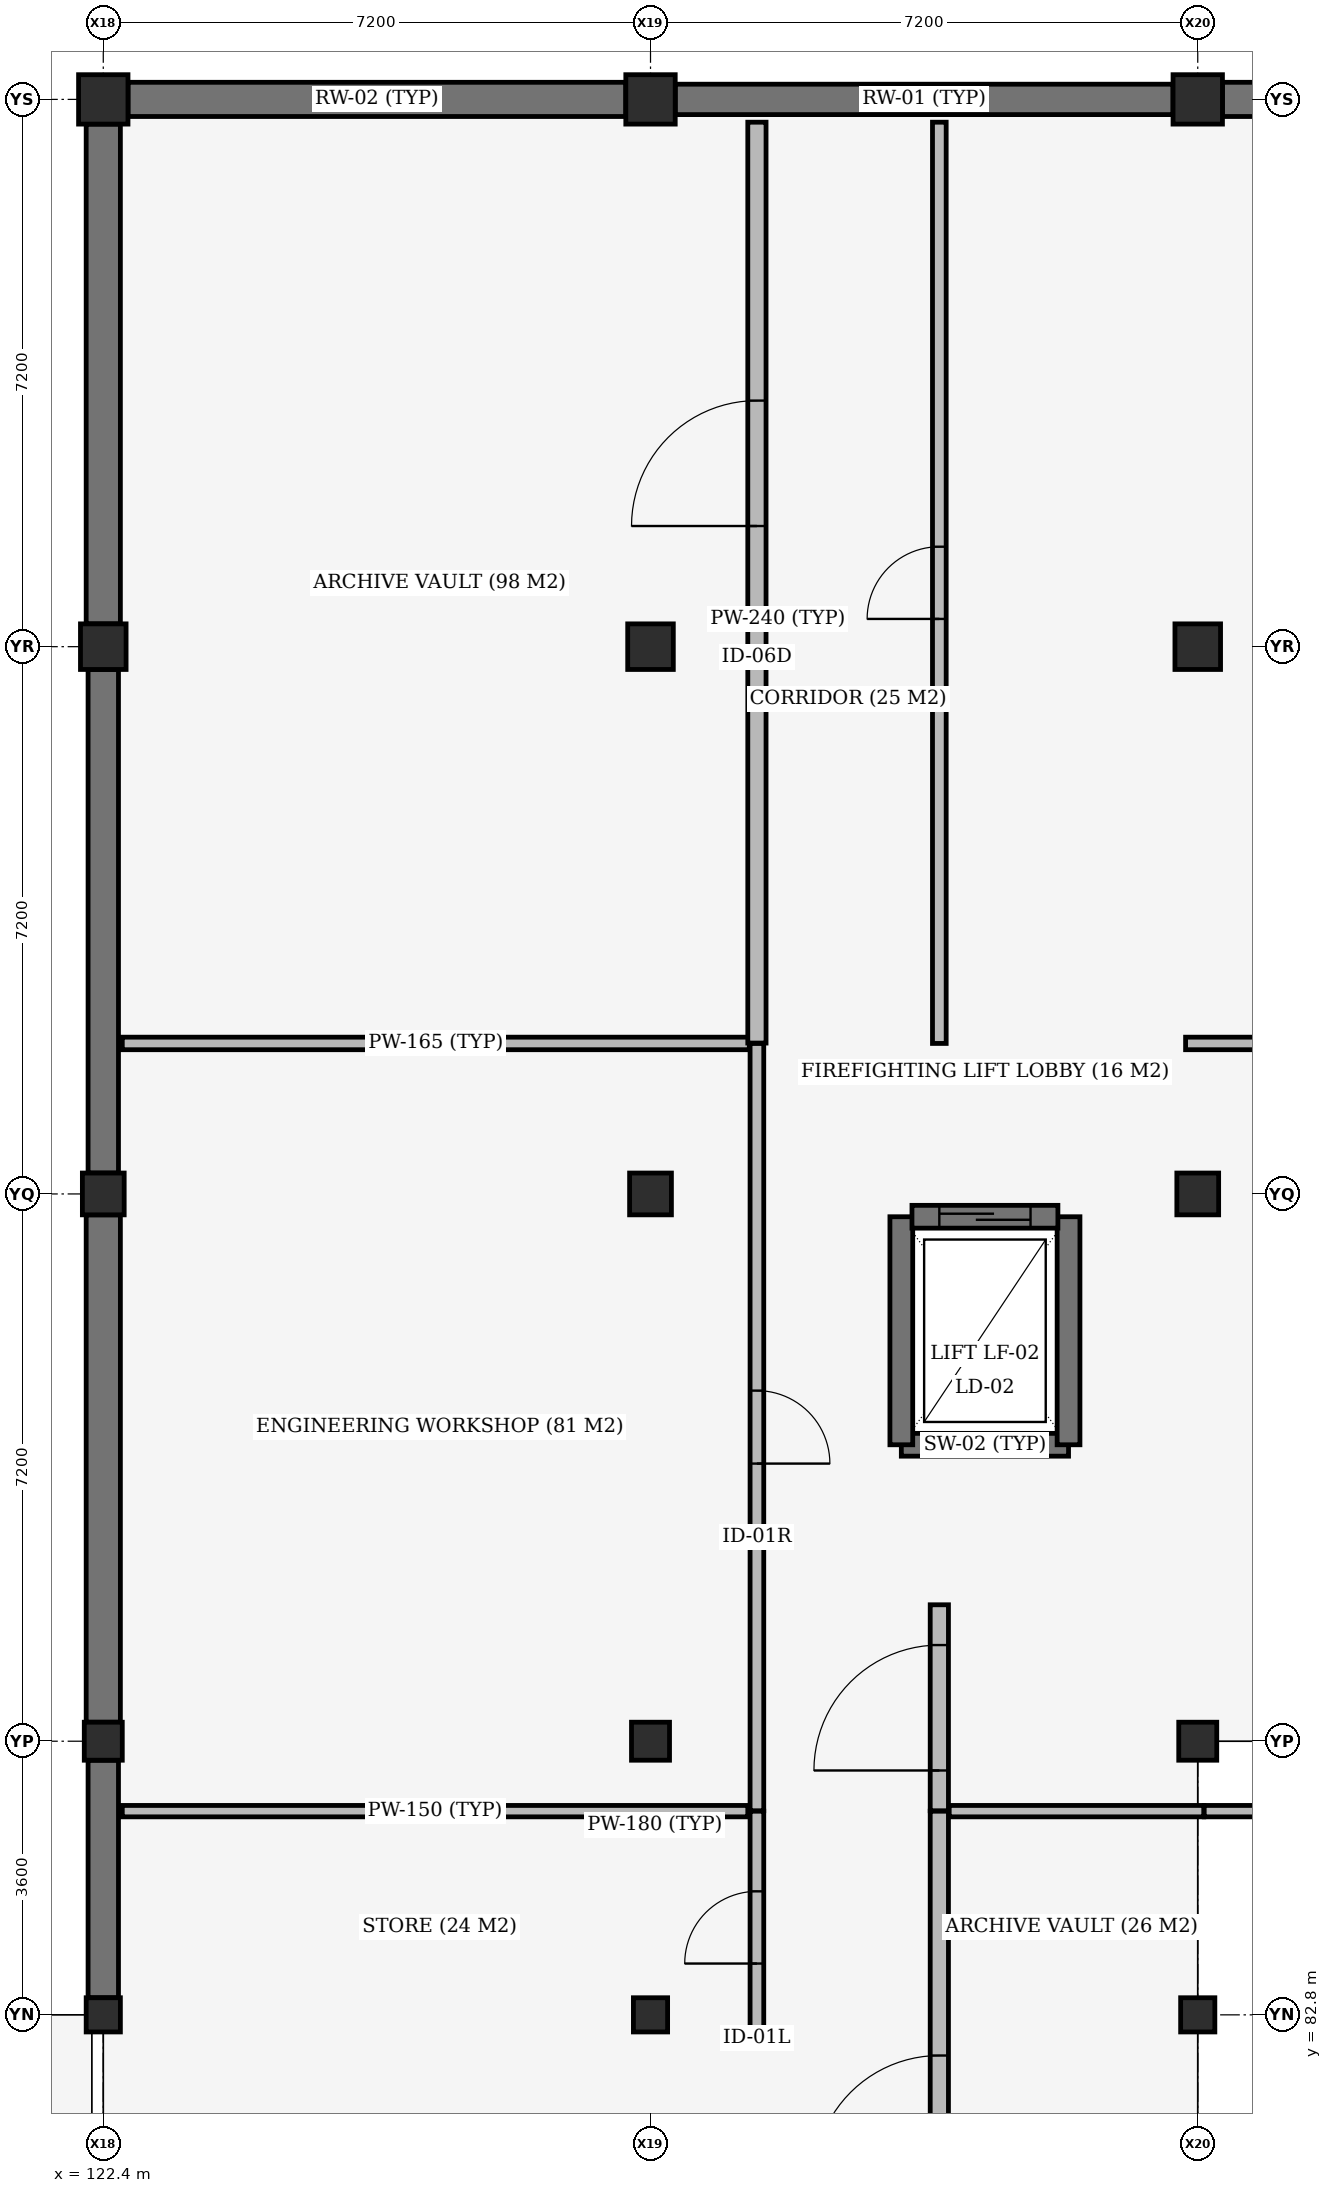
"""IFC4 building model, lengths in metres.
Left out: names, types, materials, properties, quantities, classifications, styles, units other than length and angle.
Written with IfcOpenShell. Run it as: python <this file> out.ifc"""

import sys

from ifc_helpers import new_model, si_unit, direction, frame, frame_2d, origin, origin_2d, place, context, subcontext, project, spatial, rectangle, extrude, element, fill, save


model = new_model("IFC4")
c1 = context("Model", 3, precision=1e-05, world=origin(), true_north=direction((0.0, 1.0)))
c2 = subcontext(c1, "Body", "Model", "MODEL_VIEW")
j1 = project(units=[si_unit("LENGTHUNIT", "METRE"), si_unit("PLANEANGLEUNIT", "RADIAN")], contexts=[c1])
p1 = place(None, origin())
s1 = spatial("IfcSite", under=j1, at=p1, CompositionType="ELEMENT")
p2 = place(p1, origin())
s2 = spatial("IfcBuilding", under=s1, at=p2, CompositionType="ELEMENT")
p3 = place(p2, frame((0.0, 0.0, -4.5)))
s3 = spatial("IfcBuildingStorey", under=s2, at=p3, CompositionType="ELEMENT", Elevation=-4.5)
p4 = place(p3, frame((122.4, 82.8, -0.42), z_axis=(0.0, 0.0, 1.0), x_axis=(1.0, 0.0, 0.0)))
e1 = element("IfcColumn", 1, at=p4, inside=s3, PredefinedType="COLUMN", context=c2, shape_type="SweptSolid", body=[
    extrude(rectangle(XDim=0.45, YDim=0.45, at=origin_2d()), origin(), (0.0, 0.0, 1.0), 4.6),
])
p5 = place(p3, frame((122.4, 86.4, -0.42), z_axis=(0.0, 0.0, 1.0), x_axis=(1.0, 0.0, 0.0)))
e2 = element("IfcColumn", 2, at=p5, inside=s3, PredefinedType="COLUMN", context=c2, shape_type="SweptSolid", body=[
    extrude(rectangle(XDim=0.5, YDim=0.5, at=origin_2d()), origin(), (0.0, 0.0, 1.0), 4.6),
])
p6 = place(p3, frame((122.4, 93.6, -0.42), z_axis=(0.0, 0.0, 1.0), x_axis=(1.0, 0.0, 0.0)))
e3 = element("IfcColumn", 3, at=p6, inside=s3, PredefinedType="COLUMN", context=c2, shape_type="SweptSolid", body=[
    extrude(rectangle(XDim=0.55, YDim=0.55, at=origin_2d()), origin(), (0.0, 0.0, 1.0), 4.6),
])
p7 = place(p3, frame((122.4, 100.8, -0.42), z_axis=(0.0, 0.0, 1.0), x_axis=(1.0, 0.0, 0.0)))
e4 = element("IfcColumn", 4, at=p7, inside=s3, PredefinedType="COLUMN", context=c2, shape_type="SweptSolid", body=[
    extrude(rectangle(XDim=0.6, YDim=0.6, at=origin_2d()), origin(), (0.0, 0.0, 1.0), 4.6),
])
p8 = place(p3, frame((122.4, 108.0, -0.42), z_axis=(0.0, 0.0, 1.0), x_axis=(1.0, 0.0, 0.0)))
e5 = element("IfcColumn", 5, at=p8, inside=s3, PredefinedType="COLUMN", context=c2, shape_type="SweptSolid", body=[
    extrude(rectangle(XDim=0.65, YDim=0.65, at=origin_2d()), origin(), (0.0, 0.0, 1.0), 4.6),
])
p9 = place(p3, frame((129.6, 82.8, -0.42), z_axis=(0.0, 0.0, 1.0), x_axis=(1.0, 0.0, 0.0)))
e6 = element("IfcColumn", 6, at=p9, inside=s3, PredefinedType="COLUMN", context=c2, shape_type="SweptSolid", body=[
    extrude(rectangle(XDim=0.45, YDim=0.45, at=origin_2d()), origin(), (0.0, 0.0, 1.0), 4.6),
])
p10 = place(p3, frame((129.6, 86.4, -0.42), z_axis=(0.0, 0.0, 1.0), x_axis=(1.0, 0.0, 0.0)))
e7 = element("IfcColumn", 7, at=p10, inside=s3, PredefinedType="COLUMN", context=c2, shape_type="SweptSolid", body=[
    extrude(rectangle(XDim=0.5, YDim=0.5, at=origin_2d()), origin(), (0.0, 0.0, 1.0), 4.6),
])
p11 = place(p3, frame((129.6, 93.6, -0.42), z_axis=(0.0, 0.0, 1.0), x_axis=(1.0, 0.0, 0.0)))
e8 = element("IfcColumn", 8, at=p11, inside=s3, PredefinedType="COLUMN", context=c2, shape_type="SweptSolid", body=[
    extrude(rectangle(XDim=0.55, YDim=0.55, at=origin_2d()), origin(), (0.0, 0.0, 1.0), 4.6),
])
p12 = place(p3, frame((129.6, 100.8, -0.42), z_axis=(0.0, 0.0, 1.0), x_axis=(1.0, 0.0, 0.0)))
e9 = element("IfcColumn", 9, at=p12, inside=s3, PredefinedType="COLUMN", context=c2, shape_type="SweptSolid", body=[
    extrude(rectangle(XDim=0.6, YDim=0.6, at=origin_2d()), origin(), (0.0, 0.0, 1.0), 4.6),
])
p13 = place(p3, frame((129.6, 108.0, -0.42), z_axis=(0.0, 0.0, 1.0), x_axis=(1.0, 0.0, 0.0)))
e10 = element("IfcColumn", 10, at=p13, inside=s3, PredefinedType="COLUMN", context=c2, shape_type="SweptSolid", body=[
    extrude(rectangle(XDim=0.65, YDim=0.65, at=origin_2d()), origin(), (0.0, 0.0, 1.0), 4.6),
])
p14 = place(p3, frame((136.8, 82.8, -0.42), z_axis=(0.0, 0.0, 1.0), x_axis=(1.0, 0.0, 0.0)))
e11 = element("IfcColumn", 11, at=p14, inside=s3, PredefinedType="COLUMN", context=c2, shape_type="SweptSolid", body=[
    extrude(rectangle(XDim=0.45, YDim=0.45, at=origin_2d()), origin(), (0.0, 0.0, 1.0), 4.6),
])
p15 = place(p3, frame((136.8, 86.4, -0.42), z_axis=(0.0, 0.0, 1.0), x_axis=(1.0, 0.0, 0.0)))
e12 = element("IfcColumn", 12, at=p15, inside=s3, PredefinedType="COLUMN", context=c2, shape_type="SweptSolid", body=[
    extrude(rectangle(XDim=0.5, YDim=0.5, at=origin_2d()), origin(), (0.0, 0.0, 1.0), 4.6),
])
p16 = place(p3, frame((136.8, 93.6, -0.42), z_axis=(0.0, 0.0, 1.0), x_axis=(1.0, 0.0, 0.0)))
e13 = element("IfcColumn", 13, at=p16, inside=s3, PredefinedType="COLUMN", context=c2, shape_type="SweptSolid", body=[
    extrude(rectangle(XDim=0.55, YDim=0.55, at=origin_2d()), origin(), (0.0, 0.0, 1.0), 4.6),
])
p17 = place(p3, frame((136.8, 100.8, -0.42), z_axis=(0.0, 0.0, 1.0), x_axis=(1.0, 0.0, 0.0)))
e14 = element("IfcColumn", 14, at=p17, inside=s3, PredefinedType="COLUMN", context=c2, shape_type="SweptSolid", body=[
    extrude(rectangle(XDim=0.6, YDim=0.6, at=origin_2d()), origin(), (0.0, 0.0, 1.0), 4.6),
])
p18 = place(p3, frame((136.8, 108.0, -0.42), z_axis=(0.0, 0.0, 1.0), x_axis=(1.0, 0.0, 0.0)))
e15 = element("IfcColumn", 15, at=p18, inside=s3, PredefinedType="COLUMN", context=c2, shape_type="SweptSolid", body=[
    extrude(rectangle(XDim=0.65, YDim=0.65, at=origin_2d()), origin(), (0.0, 0.0, 1.0), 4.6),
])
p19 = place(p3, frame((132.9, 90.3, 0.0), z_axis=(0.0, 0.0, 1.0), x_axis=(1.0, 0.0, 0.0)))
e16 = element("IfcWall", 16, at=p19, inside=s3, PredefinedType="SHEAR", context=c2, shape_type="SweptSolid", body=[
    extrude(rectangle(XDim=2.2, YDim=0.3, at=frame_2d((1.1, 0.0))), origin(), (0.0, 0.0, 1.0), 4.18),
])
for number, where, z_axis, x_axis in (
    (17, (132.9, 93.3, 0.0), (0.0, 0.0, 1.0), (0.0, -1.0, 0.0)),
    (18, (135.1, 90.3, 0.0), (0.0, 0.0, 1.0), (0.0, 1.0, 0.0)),
):
    element("IfcWall", number, at=place(p3, frame(where, z_axis=z_axis, x_axis=x_axis)), inside=s3, PredefinedType="SHEAR", context=c2, shape_type="SweptSolid", body=[
        extrude(rectangle(XDim=3.0, YDim=0.3, at=frame_2d((1.5, 0.0))), origin(), (0.0, 0.0, 1.0), 4.18),
    ])
p20 = place(p3, frame((122.725, 108.0, 0.0), z_axis=(0.0, 0.0, 1.0), x_axis=(1.0, 0.0, 0.0)))
e19 = element("IfcWall", 19, at=p20, inside=s3, PredefinedType="USERDEFINED", context=c2, shape_type="SweptSolid", body=[
    extrude(rectangle(XDim=6.55, YDim=0.45, at=frame_2d((3.275, 0.0))), origin(), (0.0, 0.0, 1.0), 4.18),
])
p21 = place(p3, frame((129.925, 108.0, 0.0), z_axis=(0.0, 0.0, 1.0), x_axis=(1.0, 0.0, 0.0)))
e20 = element("IfcWall", 20, at=p21, inside=s3, PredefinedType="USERDEFINED", context=c2, shape_type="SweptSolid", body=[
    extrude(rectangle(XDim=6.55, YDim=0.4, at=frame_2d((3.275, 0.0))), origin(), (0.0, 0.0, 1.0), 4.18),
])
p22 = place(p3, frame((137.125, 108.0, 0.0), z_axis=(0.0, 0.0, 1.0), x_axis=(1.0, 0.0, 0.0)))
e21 = element("IfcWall", 21, at=p22, inside=s3, PredefinedType="USERDEFINED", context=c2, shape_type="SweptSolid", body=[
    extrude(rectangle(XDim=6.625, YDim=0.45, at=frame_2d((3.312, 0.0))), origin(), (0.0, 0.0, 1.0), 4.18),
])
p23 = place(p3, frame((122.4, 83.025, 0.0), z_axis=(0.0, 0.0, 1.0), x_axis=(0.0, 1.0, 0.0)))
e22 = element("IfcWall", 22, at=p23, inside=s3, PredefinedType="USERDEFINED", context=c2, shape_type="SweptSolid", body=[
    extrude(rectangle(XDim=3.125, YDim=0.4, at=frame_2d((1.562, 0.0))), origin(), (0.0, 0.0, 1.0), 4.18),
])
p24 = place(p3, frame((122.4, 86.65, 0.0), z_axis=(0.0, 0.0, 1.0), x_axis=(0.0, 1.0, 0.0)))
e23 = element("IfcWall", 23, at=p24, inside=s3, PredefinedType="USERDEFINED", context=c2, shape_type="SweptSolid", body=[
    extrude(rectangle(XDim=6.675, YDim=0.45, at=frame_2d((3.337, 0.0))), origin(), (0.0, 0.0, 1.0), 4.18),
])
p25 = place(p3, frame((122.4, 93.875, 0.0), z_axis=(0.0, 0.0, 1.0), x_axis=(0.0, 1.0, 0.0)))
e24 = element("IfcWall", 24, at=p25, inside=s3, PredefinedType="USERDEFINED", context=c2, shape_type="SweptSolid", body=[
    extrude(rectangle(XDim=6.625, YDim=0.4, at=frame_2d((3.312, 0.0))), origin(), (0.0, 0.0, 1.0), 4.18),
])
p26 = place(p3, frame((122.4, 101.1, 0.0), z_axis=(0.0, 0.0, 1.0), x_axis=(0.0, 1.0, 0.0)))
e25 = element("IfcWall", 25, at=p26, inside=s3, PredefinedType="USERDEFINED", context=c2, shape_type="SweptSolid", body=[
    extrude(rectangle(XDim=6.575, YDim=0.45, at=frame_2d((3.288, 0.0))), origin(), (0.0, 0.0, 1.0), 4.18),
])
p27 = place(p3, frame((133.04, 93.3, 0.0), z_axis=(0.0, 0.0, 1.0), x_axis=(1.0, 0.0, 0.0)))
e26 = element("IfcWall", 26, at=p27, inside=s3, PredefinedType="SHEAR", context=c2, shape_type="SweptSolid", body=[
    extrude(rectangle(XDim=1.92, YDim=0.3, at=frame_2d((0.96, 0.0))), origin(), (0.0, 0.0, 1.0), 4.18),
])
p28 = place(p27, frame((0.36, 0.0, 0.0)))
e27 = element("IfcOpeningElement", 27, at=p28, cuts=e26, PredefinedType="OPENING", context=c2, shape_type="SweptSolid", body=[
    extrude(rectangle(XDim=1.2, YDim=2.1, at=frame_2d((0.6, 1.05))), frame((0.0, 0.16, 0.0), z_axis=(0.0, -1.0, 0.0), x_axis=(1.0, 0.0, 0.0)), (0.0, 0.0, 1.0), 0.32),
])
p29 = place(p3, frame((131.0, 82.42, 0.0), z_axis=(0.0, 0.0, 1.0), x_axis=(0.0, 1.0, 0.0)))
e28 = element("IfcWall", 28, at=p29, inside=s3, PredefinedType="PARTITIONING", context=c2, shape_type="SweptSolid", body=[
    extrude(rectangle(XDim=3.06, YDim=0.18, at=frame_2d((1.53, 0.0))), origin(), (0.0, 0.0, 1.0), 3.53),
])
p30 = place(p29, frame((1.055, 0.0, 0.0)))
e29 = element("IfcOpeningElement", 29, at=p30, cuts=e28, PredefinedType="OPENING", context=c2, shape_type="SweptSolid", body=[
    extrude(rectangle(XDim=0.95, YDim=2.15, at=frame_2d((0.475, 1.075))), frame((0.0, 0.1, 0.0), z_axis=(0.0, -1.0, 0.0), x_axis=(1.0, 0.0, 0.0)), (0.0, 0.0, 1.0), 0.2),
])
p31 = place(p3, frame((122.65, 85.48, 0.0), z_axis=(0.0, 0.0, 1.0), x_axis=(1.0, 0.0, 0.0)))
e30 = element("IfcWall", 30, at=p31, inside=s3, PredefinedType="PARTITIONING", context=c2, shape_type="SweptSolid", body=[
    extrude(rectangle(XDim=8.23, YDim=0.15, at=frame_2d((4.115, 0.0))), origin(), (0.0, 0.0, 1.0), 3.58),
])
p32 = place(p3, frame((131.0, 85.485, 0.0), z_axis=(0.0, 0.0, 1.0), x_axis=(0.0, 1.0, 0.0)))
e31 = element("IfcWall", 31, at=p32, inside=s3, PredefinedType="PARTITIONING", context=c2, shape_type="SweptSolid", body=[
    extrude(rectangle(XDim=10.095, YDim=0.18, at=frame_2d((5.047, 0.0))), origin(), (0.0, 0.0, 1.0), 3.48),
])
p33 = place(p32, frame((4.567, 0.0, 0.0)))
e32 = element("IfcOpeningElement", 32, at=p33, cuts=e31, PredefinedType="OPENING", context=c2, shape_type="SweptSolid", body=[
    extrude(rectangle(XDim=0.96, YDim=2.15, at=frame_2d((0.48, 1.075))), frame((0.0, 0.1, 0.0), z_axis=(0.0, -1.0, 0.0), x_axis=(1.0, 0.0, 0.0)), (0.0, 0.0, 1.0), 0.2),
])
p34 = place(p3, frame((122.65, 95.58, 0.0), z_axis=(0.0, 0.0, 1.0), x_axis=(1.0, 0.0, 0.0)))
e33 = element("IfcWall", 33, at=p34, inside=s3, PredefinedType="PARTITIONING", context=c2, shape_type="SweptSolid", body=[
    extrude(rectangle(XDim=8.25, YDim=0.165, at=frame_2d((4.125, 0.0))), origin(), (0.0, 0.0, 1.0), 3.48),
])
p35 = place(p3, frame((131.0, 95.585, 0.0), z_axis=(0.0, 0.0, 1.0), x_axis=(0.0, 1.0, 0.0)))
e34 = element("IfcWall", 34, at=p35, inside=s3, PredefinedType="STANDARD", context=c2, shape_type="SweptSolid", body=[
    extrude(rectangle(XDim=12.115, YDim=0.24, at=frame_2d((6.058, 0.0))), origin(), (0.0, 0.0, 1.0), 3.38),
])
p36 = place(p35, frame((6.802, 0.0, 0.0)))
e35 = element("IfcOpeningElement", 35, at=p36, cuts=e34, PredefinedType="OPENING", context=c2, shape_type="SweptSolid", body=[
    extrude(rectangle(XDim=1.65, YDim=2.25, at=frame_2d((0.825, 1.125))), frame((0.0, 0.13, 0.0), z_axis=(0.0, -1.0, 0.0), x_axis=(1.0, 0.0, 0.0)), (0.0, 0.0, 1.0), 0.26),
])
p37 = place(p3, frame((133.4, 77.4, 0.0), z_axis=(0.0, 0.0, 1.0), x_axis=(0.0, 1.0, 0.0)))
e36 = element("IfcWall", 36, at=p37, inside=s3, PredefinedType="STANDARD", context=c2, shape_type="SweptSolid", body=[
    extrude(rectangle(XDim=8.08, YDim=0.24, at=frame_2d((4.04, 0.0))), origin(), (0.0, 0.0, 1.0), 3.53),
])
p38 = place(p37, frame((3.215, 0.0, 0.0)))
e37 = element("IfcOpeningElement", 37, at=p38, cuts=e36, PredefinedType="OPENING", context=c2, shape_type="SweptSolid", body=[
    extrude(rectangle(XDim=1.65, YDim=2.25, at=frame_2d((0.825, 1.125))), frame((0.0, 0.13, 0.0), z_axis=(0.0, -1.0, 0.0), x_axis=(1.0, 0.0, 0.0)), (0.0, 0.0, 1.0), 0.26),
])
p39 = place(p3, frame((133.53, 85.48, 0.0), z_axis=(0.0, 0.0, 1.0), x_axis=(1.0, 0.0, 0.0)))
e38 = element("IfcWall", 38, at=p39, inside=s3, PredefinedType="PARTITIONING", context=c2, shape_type="SweptSolid", body=[
    extrude(rectangle(XDim=3.35, YDim=0.15, at=frame_2d((1.675, 0.0))), origin(), (0.0, 0.0, 1.0), 3.38),
])
p40 = place(p3, frame((133.4, 85.485, 0.0), z_axis=(0.0, 0.0, 1.0), x_axis=(0.0, 1.0, 0.0)))
e39 = element("IfcWall", 39, at=p40, inside=s3, PredefinedType="STANDARD", context=c2, shape_type="SweptSolid", body=[
    extrude(rectangle(XDim=2.71, YDim=0.24, at=frame_2d((1.355, 0.0))), origin(), (0.0, 0.0, 1.0), 3.58),
])
p41 = place(p40, frame((0.53, 0.0, 0.0)))
e40 = element("IfcOpeningElement", 40, at=p41, cuts=e39, PredefinedType="OPENING", context=c2, shape_type="SweptSolid", body=[
    extrude(rectangle(XDim=1.65, YDim=2.25, at=frame_2d((0.825, 1.125))), frame((0.0, 0.13, 0.0), z_axis=(0.0, -1.0, 0.0), x_axis=(1.0, 0.0, 0.0)), (0.0, 0.0, 1.0), 0.26),
])
p42 = place(p3, frame((136.885, 85.48, 0.0), z_axis=(0.0, 0.0, 1.0), x_axis=(1.0, 0.0, 0.0)))
e41 = element("IfcWall", 41, at=p42, inside=s3, PredefinedType="PARTITIONING", context=c2, shape_type="SweptSolid", body=[
    extrude(rectangle(XDim=22.475, YDim=0.15, at=frame_2d((11.238, 0.0))), origin(), (0.0, 0.0, 1.0), 3.38),
])
p43 = place(p3, frame((136.64, 95.58, 0.0), z_axis=(0.0, 0.0, 1.0), x_axis=(1.0, 0.0, 0.0)))
e42 = element("IfcWall", 42, at=p43, inside=s3, PredefinedType="PARTITIONING", context=c2, shape_type="SweptSolid", body=[
    extrude(rectangle(XDim=23.04, YDim=0.165, at=frame_2d((11.52, 0.0))), origin(), (0.0, 0.0, 1.0), 3.53),
])
p44 = place(p3, frame((133.4, 95.58, 0.0), z_axis=(0.0, 0.0, 1.0), x_axis=(0.0, 1.0, 0.0)))
e43 = element("IfcWall", 43, at=p44, inside=s3, PredefinedType="PARTITIONING", context=c2, shape_type="SweptSolid", body=[
    extrude(rectangle(XDim=12.12, YDim=0.18, at=frame_2d((6.06, 0.0))), origin(), (0.0, 0.0, 1.0), 3.38),
])
p45 = place(p44, frame((5.585, 0.0, 0.0)))
e44 = element("IfcOpeningElement", 44, at=p45, cuts=e43, PredefinedType="OPENING", context=c2, shape_type="SweptSolid", body=[
    extrude(rectangle(XDim=0.95, YDim=2.15, at=frame_2d((0.475, 1.075))), frame((0.0, 0.1, 0.0), z_axis=(0.0, -1.0, 0.0), x_axis=(1.0, 0.0, 0.0)), (0.0, 0.0, 1.0), 0.2),
])
p46 = place(p28, origin())
e45 = element("IfcDoor", 45, at=p46, inside=s3, OperationType="SLIDING_TO_LEFT", PredefinedType="DOOR", context=c2, shape_type="SweptSolid", body=[
    extrude(rectangle(XDim=1.2, YDim=2.1, at=frame_2d((0.6, 1.05))), frame((0.0, 0.025, 0.0), z_axis=(0.0, -1.0, 0.0), x_axis=(1.0, 0.0, 0.0)), (0.0, 0.0, 1.0), 0.05),
])
fill(e27, e45)
p47 = place(p30, origin())
e46 = element("IfcDoor", 46, at=p47, inside=s3, OperationType="SINGLE_SWING_LEFT", PredefinedType="DOOR", context=c2, shape_type="SweptSolid", body=[
    extrude(rectangle(XDim=0.95, YDim=2.15, at=frame_2d((0.475, 1.075))), frame((0.0, 0.025, 0.0), z_axis=(0.0, -1.0, 0.0), x_axis=(1.0, 0.0, 0.0)), (0.0, 0.0, 1.0), 0.05),
])
fill(e29, e46)
p48 = place(p33, origin())
e47 = element("IfcDoor", 47, at=p48, inside=s3, OperationType="SINGLE_SWING_RIGHT", PredefinedType="DOOR", context=c2, shape_type="SweptSolid", body=[
    extrude(rectangle(XDim=0.96, YDim=2.15, at=frame_2d((0.48, 1.075))), frame((0.0, 0.025, 0.0), z_axis=(0.0, -1.0, 0.0), x_axis=(1.0, 0.0, 0.0)), (0.0, 0.0, 1.0), 0.05),
])
fill(e32, e47)
p49 = place(p36, origin())
e48 = element("IfcDoor", 48, at=p49, inside=s3, OperationType="DOUBLE_DOOR_SINGLE_SWING", PredefinedType="DOOR", context=c2, shape_type="SweptSolid", body=[
    extrude(rectangle(XDim=1.65, YDim=2.25, at=frame_2d((0.825, 1.125))), frame((0.0, 0.025, 0.0), z_axis=(0.0, -1.0, 0.0), x_axis=(1.0, 0.0, 0.0)), (0.0, 0.0, 1.0), 0.05),
])
fill(e35, e48)
p50 = place(p38, origin())
e49 = element("IfcDoor", 49, at=p50, inside=s3, OperationType="DOUBLE_DOOR_SINGLE_SWING", PredefinedType="DOOR", context=c2, shape_type="SweptSolid", body=[
    extrude(rectangle(XDim=1.65, YDim=2.25, at=frame_2d((0.825, 1.125))), frame((0.0, 0.025, 0.0), z_axis=(0.0, -1.0, 0.0), x_axis=(1.0, 0.0, 0.0)), (0.0, 0.0, 1.0), 0.05),
])
fill(e37, e49)
p51 = place(p41, origin())
e50 = element("IfcDoor", 50, at=p51, inside=s3, OperationType="DOUBLE_DOOR_SINGLE_SWING", PredefinedType="DOOR", context=c2, shape_type="SweptSolid", body=[
    extrude(rectangle(XDim=1.65, YDim=2.25, at=frame_2d((0.825, 1.125))), frame((0.0, 0.025, 0.0), z_axis=(0.0, -1.0, 0.0), x_axis=(1.0, 0.0, 0.0)), (0.0, 0.0, 1.0), 0.05),
])
fill(e40, e50)
p52 = place(p45, origin())
e51 = element("IfcDoor", 51, at=p52, inside=s3, OperationType="SINGLE_SWING_LEFT", PredefinedType="DOOR", context=c2, shape_type="SweptSolid", body=[
    extrude(rectangle(XDim=0.95, YDim=2.15, at=frame_2d((0.475, 1.075))), frame((0.0, 0.025, 0.0), z_axis=(0.0, -1.0, 0.0), x_axis=(1.0, 0.0, 0.0)), (0.0, 0.0, 1.0), 0.05),
])
fill(e44, e51)
save(model, sys.argv[1])
